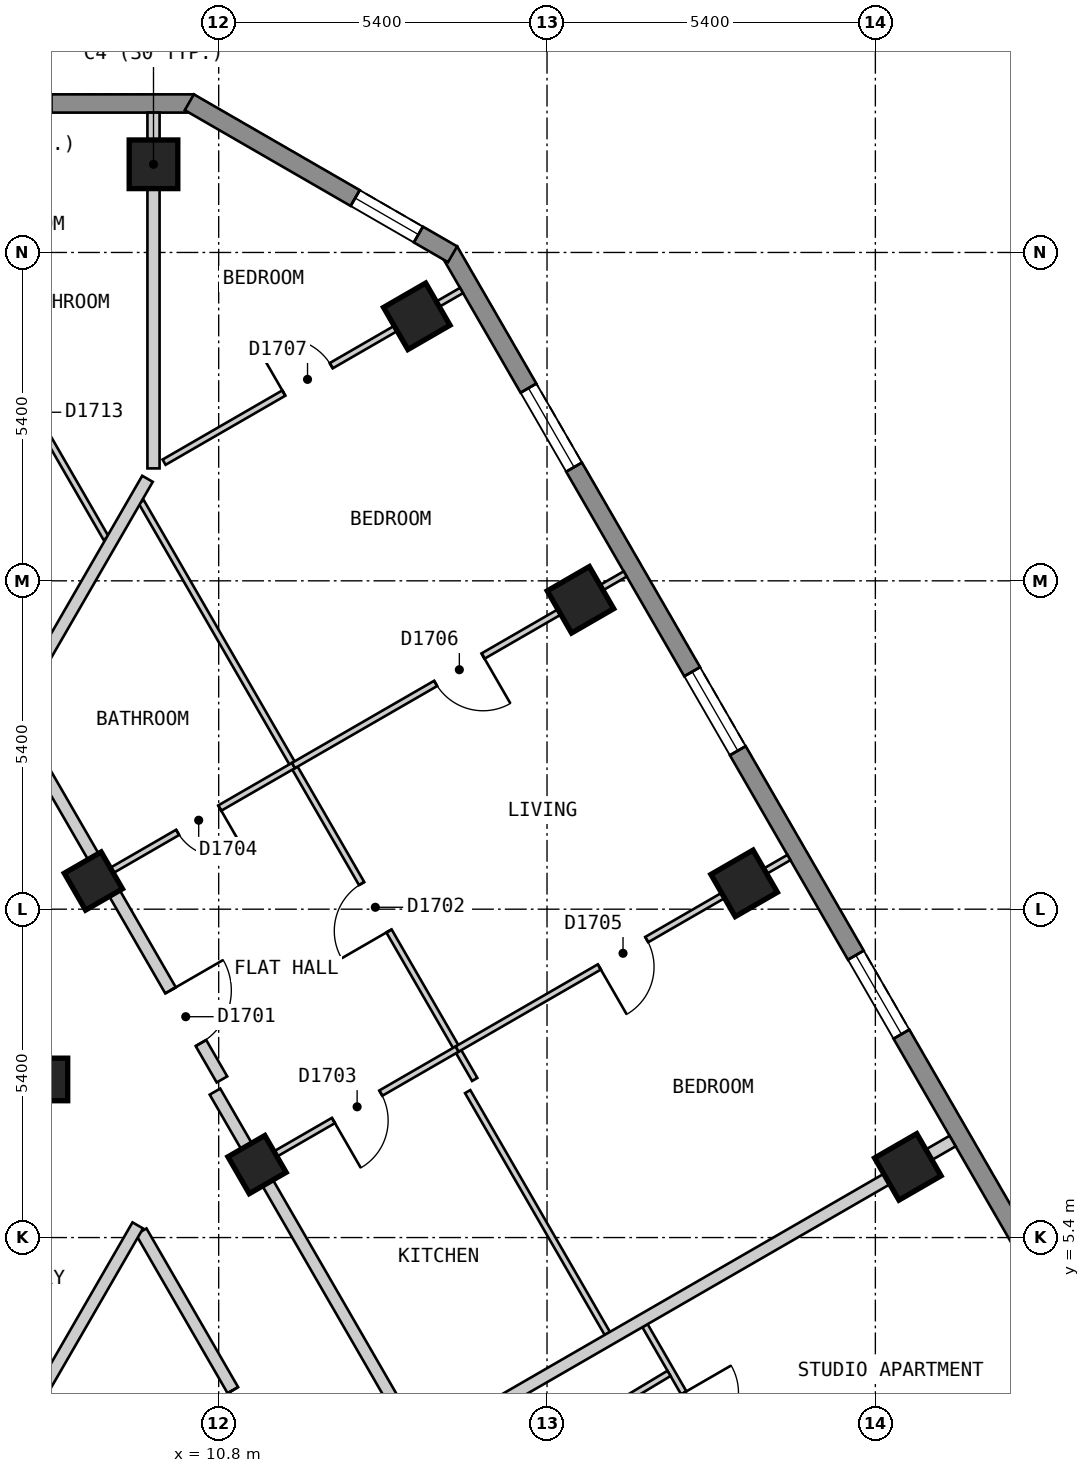
"""IFC4 building model, lengths in metres.
Left out: names, types, materials, properties, quantities, classifications, styles, units other than length and angle.
Written with IfcOpenShell. Run it as: python <this file> out.ifc"""

import sys

from ifc_helpers import new_model, si_unit, direction, frame, frame_2d, origin, origin_2d, place, context, subcontext, project, spatial, polyline, rectangle, outline, extrude, element, fill, save


model = new_model("IFC4")
c1 = context("Model", 3, precision=1e-05, world=origin(), true_north=direction((0.0, 1.0)))
c2 = subcontext(c1, "Body", "Model", "MODEL_VIEW")
j1 = project(units=[si_unit("LENGTHUNIT", "METRE"), si_unit("PLANEANGLEUNIT", "RADIAN")], contexts=[c1])
p1 = place(None, origin())
s1 = spatial("IfcSite", under=j1, at=p1, CompositionType="ELEMENT")
p2 = place(p1, origin())
s2 = spatial("IfcBuilding", under=s1, at=p2, CompositionType="ELEMENT")
p3 = place(p2, frame((0.0, 0.0, 187.2)))
s3 = spatial("IfcBuildingStorey", under=s2, at=p3, CompositionType="ELEMENT", Elevation=187.2)
for number, where, z_axis, x_axis in (
    (1, (9.728, 23.05, 0.0), (0.0, 0.0, 1.0), (-1.0, 0.0, 0.0)),
    (2, (22.134, 6.562, 0.0), (0.0, 0.0, 1.0), (-0.5, 0.866, 0.0)),
    (3, (19.442, 11.225, 0.0), (0.0, 0.0, 1.0), (-0.5, 0.866, 0.0)),
    (4, (16.75, 15.888, 0.0), (0.0, 0.0, 1.0), (-0.5, 0.866, 0.0)),
    (5, (14.058, 20.55, 0.0), (0.0, 0.0, 1.0), (-0.5, 0.866, 0.0)),
):
    element("IfcColumn", number, at=place(p3, frame(where, z_axis=z_axis, x_axis=x_axis)), inside=s3, PredefinedType="COLUMN", context=c2, shape_type="SweptSolid", body=[
        extrude(rectangle(XDim=0.8, YDim=0.8, at=origin_2d()), origin(), (0.0, 0.0, 1.0), 3.0),
    ])
for number, where, z_axis, x_axis in (
    (6, (11.431, 6.6, 0.0), (0.0, 0.0, 1.0), (-0.5, 0.866, 0.0)),
    (7, (7.967, 8.0, 0.0), (0.0, 0.0, 1.0), (1.0, 0.0, 0.0)),
    (8, (8.739, 11.263, 0.0), (0.0, 0.0, 1.0), (-0.5, 0.866, 0.0)),
):
    element("IfcColumn", number, at=place(p3, frame(where, z_axis=z_axis, x_axis=x_axis)), inside=s3, PredefinedType="COLUMN", context=c2, shape_type="SweptSolid", body=[
        extrude(rectangle(XDim=0.7, YDim=0.7, at=origin_2d()), origin(), (0.0, 0.0, 1.0), 3.0),
    ])
p4 = place(p3, frame((10.392, 24.05, 0.0), z_axis=(0.0, 0.0, 1.0), x_axis=(-1.0, 0.0, 0.0)))
e9 = element("IfcWall", 9, at=p4, inside=s3, PredefinedType="SOLIDWALL", context=c2, shape_type="SweptSolid", body=[
    extrude(outline(polyline([(0.0, -0.15), (20.784, -0.15), (20.704, 0.15), (0.08, 0.15), (0.0, -0.15)])), origin(), (0.0, 0.0, 1.0), 2.7),
])
p5 = place(p4, frame((2.346, 0.0, 0.15)))
e10 = element("IfcOpeningElement", 10, at=p5, cuts=e9, PredefinedType="OPENING", context=c2, shape_type="SweptSolid", body=[
    extrude(rectangle(XDim=1.5, YDim=2.1, at=frame_2d((0.75, 1.05))), frame((0.0, 0.16, 0.0), z_axis=(0.0, -1.0, 0.0), x_axis=(1.0, 0.0, 0.0)), (0.0, 0.0, 1.0), 0.32),
])
p6 = place(p4, frame((7.21, 0.0, 0.15)))
e11 = element("IfcOpeningElement", 11, at=p6, cuts=e9, PredefinedType="OPENING", context=c2, shape_type="SweptSolid", body=[
    extrude(rectangle(XDim=1.5, YDim=2.1, at=frame_2d((0.75, 1.05))), frame((0.0, 0.16, 0.0), z_axis=(0.0, -1.0, 0.0), x_axis=(1.0, 0.0, 0.0)), (0.0, 0.0, 1.0), 0.32),
])
p7 = place(p4, frame((12.074, 0.0, 0.15)))
e12 = element("IfcOpeningElement", 12, at=p7, cuts=e9, PredefinedType="OPENING", context=c2, shape_type="SweptSolid", body=[
    extrude(rectangle(XDim=1.5, YDim=2.1, at=frame_2d((0.75, 1.05))), frame((0.0, 0.16, 0.0), z_axis=(0.0, -1.0, 0.0), x_axis=(1.0, 0.0, 0.0)), (0.0, 0.0, 1.0), 0.32),
])
p8 = place(p4, frame((16.938, 0.0, 0.15)))
e13 = element("IfcOpeningElement", 13, at=p8, cuts=e9, PredefinedType="OPENING", context=c2, shape_type="SweptSolid", body=[
    extrude(rectangle(XDim=1.5, YDim=2.1, at=frame_2d((0.75, 1.05))), frame((0.0, 0.16, 0.0), z_axis=(0.0, -1.0, 0.0), x_axis=(1.0, 0.0, 0.0)), (0.0, 0.0, 1.0), 0.32),
])
p9 = place(p3, frame((26.024, 1.825, 0.0), z_axis=(0.0, 0.0, 1.0), x_axis=(-0.500010537973, 0.866019319597, 0.0)))
e14 = element("IfcWall", 14, at=p9, inside=s3, PredefinedType="SOLIDWALL", context=c2, shape_type="SweptSolid", body=[
    extrude(outline(polyline([(0.0, -0.15), (22.863, -0.15), (22.783, 0.15), (0.08, 0.15), (0.0, -0.15)])), origin(), (0.0, 0.0, 1.0), 2.7),
])
p10 = place(p9, frame((2.606, 0.0, 0.15)))
e15 = element("IfcOpeningElement", 15, at=p10, cuts=e14, PredefinedType="OPENING", context=c2, shape_type="SweptSolid", body=[
    extrude(rectangle(XDim=1.5, YDim=2.1, at=frame_2d((0.75, 1.05))), frame((0.0, 0.16, 0.0), z_axis=(0.0, -1.0, 0.0), x_axis=(1.0, 0.0, 0.0)), (0.0, 0.0, 1.0), 0.32),
])
p11 = place(p9, frame((7.99, 0.0, 0.15)))
e16 = element("IfcOpeningElement", 16, at=p11, cuts=e14, PredefinedType="OPENING", context=c2, shape_type="SweptSolid", body=[
    extrude(rectangle(XDim=1.5, YDim=2.1, at=frame_2d((0.75, 1.05))), frame((0.0, 0.16, 0.0), z_axis=(0.0, -1.0, 0.0), x_axis=(1.0, 0.0, 0.0)), (0.0, 0.0, 1.0), 0.32),
])
p12 = place(p9, frame((13.373, 0.0, 0.15)))
e17 = element("IfcOpeningElement", 17, at=p12, cuts=e14, PredefinedType="OPENING", context=c2, shape_type="SweptSolid", body=[
    extrude(rectangle(XDim=1.5, YDim=2.1, at=frame_2d((0.75, 1.05))), frame((0.0, 0.16, 0.0), z_axis=(0.0, -1.0, 0.0), x_axis=(1.0, 0.0, 0.0)), (0.0, 0.0, 1.0), 0.32),
])
p13 = place(p9, frame((18.758, 0.0, 0.15)))
e18 = element("IfcOpeningElement", 18, at=p13, cuts=e14, PredefinedType="OPENING", context=c2, shape_type="SweptSolid", body=[
    extrude(rectangle(XDim=1.5, YDim=2.1, at=frame_2d((0.75, 1.05))), frame((0.0, 0.16, 0.0), z_axis=(0.0, -1.0, 0.0), x_axis=(1.0, 0.0, 0.0)), (0.0, 0.0, 1.0), 0.32),
])
p14 = place(p3, frame((14.647, 21.57, 0.0), z_axis=(0.0, 0.0, 1.0), x_axis=(-0.866022959057, 0.500004234368, 0.0)))
e19 = element("IfcWall", 19, at=p14, inside=s3, PredefinedType="SOLIDWALL", context=c2, shape_type="SweptSolid", body=[
    extrude(outline(polyline([(0.0, -0.15), (5.0, -0.15), (4.92, 0.15), (0.08, 0.15), (0.0, -0.15)])), origin(), (0.0, 0.0, 1.0), 2.7),
])
p15 = place(p14, frame((0.65, 0.0, 0.15)))
e20 = element("IfcOpeningElement", 20, at=p15, cuts=e19, PredefinedType="OPENING", context=c2, shape_type="SweptSolid", body=[
    extrude(rectangle(XDim=1.2, YDim=2.1, at=frame_2d((0.6, 1.05))), frame((0.0, 0.16, 0.0), z_axis=(0.0, -1.0, 0.0), x_axis=(1.0, 0.0, 0.0)), (0.0, 0.0, 1.0), 0.32),
])
p16 = place(p3, frame((9.526, 5.5, 0.0), z_axis=(0.0, 0.0, 1.0), x_axis=(0.500062092869, -0.865989551482, 0.0)))
e21 = element("IfcWall", 21, at=p16, inside=s3, PredefinedType="PARTITIONING", context=c2, shape_type="SweptSolid", body=[
    extrude(rectangle(XDim=6.927, YDim=0.2, at=frame_2d((3.464, 0.0))), origin(), (0.0, 0.0, 1.0), 2.7),
])
p17 = place(p16, frame((3.014, 0.0, 0.0)))
e22 = element("IfcOpeningElement", 22, at=p17, cuts=e21, PredefinedType="OPENING", context=c2, shape_type="SweptSolid", body=[
    extrude(rectangle(XDim=0.9, YDim=2.1, at=frame_2d((0.45, 1.05))), frame((0.0, 0.11, 0.0), z_axis=(0.0, -1.0, 0.0), x_axis=(1.0, 0.0, 0.0)), (0.0, 0.0, 1.0), 0.22),
])
p18 = place(p3, frame((10.739, 7.8, 0.0), z_axis=(0.0, 0.0, 1.0), x_axis=(0.500023726918, -0.866011704609, 0.0)))
e23 = element("IfcWall", 23, at=p18, inside=s3, PredefinedType="PARTITIONING", context=c2, shape_type="SweptSolid", body=[
    extrude(rectangle(XDim=9.47, YDim=0.2, at=frame_2d((4.735, 0.0))), origin(), (0.0, 0.0, 1.0), 2.7),
])
p19 = place(p18, frame((8.168, 0.0, 0.0)))
e24 = element("IfcOpeningElement", 24, at=p19, cuts=e23, PredefinedType="OPENING", context=c2, shape_type="SweptSolid", body=[
    extrude(rectangle(XDim=1.0, YDim=2.1, at=frame_2d((0.5, 1.05))), frame((0.0, 0.11, 0.0), z_axis=(0.0, -1.0, 0.0), x_axis=(1.0, 0.0, 0.0)), (0.0, 0.0, 1.0), 0.22),
])
p20 = place(p3, frame((5.485, 17.3, 0.0), z_axis=(0.0, 0.0, 1.0), x_axis=(0.499965832213, -0.866045129667, 0.0)))
e25 = element("IfcWall", 25, at=p20, inside=s3, PredefinedType="PARTITIONING", context=c2, shape_type="SweptSolid", body=[
    extrude(rectangle(XDim=10.739, YDim=0.2, at=frame_2d((5.369, 0.0))), origin(), (0.0, 0.0, 1.0), 2.7),
])
p21 = place(p20, frame((9.047, 0.0, 0.0)))
e26 = element("IfcOpeningElement", 26, at=p21, cuts=e25, PredefinedType="OPENING", context=c2, shape_type="SweptSolid", body=[
    extrude(rectangle(XDim=1.0, YDim=2.1, at=frame_2d((0.5, 1.05))), frame((0.0, 0.11, 0.0), z_axis=(0.0, -1.0, 0.0), x_axis=(1.0, 0.0, 0.0)), (0.0, 0.0, 1.0), 0.22),
])
p22 = place(p3, frame((7.028, 1.373, 0.0), z_axis=(0.0, 0.0, 1.0), x_axis=(0.500065924398, 0.86598733897, 0.0)))
e27 = element("IfcWall", 27, at=p22, inside=s3, PredefinedType="PARTITIONING", context=c2, shape_type="SweptSolid", body=[
    extrude(rectangle(XDim=4.881, YDim=0.2, at=frame_2d((2.44, 0.0))), origin(), (0.0, 0.0, 1.0), 2.7),
])
p23 = place(p3, frame((7.073, 20.15, 0.0), z_axis=(0.0, 0.0, 1.0), x_axis=(0.499917691695, -0.866072919292, 0.0)))
e28 = element("IfcWall", 28, at=p23, inside=s3, PredefinedType="PARTITIONING", context=c2, shape_type="SweptSolid", body=[
    extrude(rectangle(XDim=3.753, YDim=0.1, at=frame_2d((1.876, 0.0))), origin(), (0.0, 0.0, 1.0), 2.7),
])
p24 = place(p23, frame((0.96, 0.0, 0.0)))
e29 = element("IfcOpeningElement", 29, at=p24, cuts=e28, PredefinedType="OPENING", context=c2, shape_type="SweptSolid", body=[
    extrude(rectangle(XDim=0.8, YDim=2.1, at=frame_2d((0.4, 1.05))), frame((0.0, 0.06, 0.0), z_axis=(0.0, -1.0, 0.0), x_axis=(1.0, 0.0, 0.0)), (0.0, 0.0, 1.0), 0.12),
])
p25 = place(p3, frame((14.895, 7.8, 0.0), z_axis=(0.0, 0.0, 1.0), x_axis=(0.500050787847, -0.865996079421, 0.0)))
e30 = element("IfcWall", 30, at=p25, inside=s3, PredefinedType="PARTITIONING", context=c2, shape_type="SweptSolid", body=[
    extrude(rectangle(XDim=4.591, YDim=0.1, at=frame_2d((2.296, 0.0))), origin(), (0.0, 0.0, 1.0), 2.7),
])
p26 = place(p3, frame((9.526, 17.5, 0.0), z_axis=(0.0, 0.0, 1.0), x_axis=(0.500019134094, -0.866014356428, 0.0)))
e31 = element("IfcWall", 31, at=p26, inside=s3, PredefinedType="PARTITIONING", context=c2, shape_type="SweptSolid", body=[
    extrude(rectangle(XDim=10.97, YDim=0.1, at=frame_2d((5.485, 0.0))), origin(), (0.0, 0.0, 1.0), 2.7),
])
p27 = place(p26, frame((7.25, 0.0, 0.0)))
e32 = element("IfcOpeningElement", 32, at=p27, cuts=e31, PredefinedType="OPENING", context=c2, shape_type="SweptSolid", body=[
    extrude(rectangle(XDim=0.9, YDim=2.1, at=frame_2d((0.45, 1.05))), frame((0.0, 0.06, 0.0), z_axis=(0.0, -1.0, 0.0), x_axis=(1.0, 0.0, 0.0)), (0.0, 0.0, 1.0), 0.12),
])
p28 = place(p3, frame((17.811, 3.951, 0.0), z_axis=(0.0, 0.0, 1.0), x_axis=(0.499976149225, -0.866039173598, 0.0)))
e33 = element("IfcWall", 33, at=p28, inside=s3, PredefinedType="PARTITIONING", context=c2, shape_type="SweptSolid", body=[
    extrude(rectangle(XDim=2.888, YDim=0.1, at=frame_2d((1.444, 0.0))), origin(), (0.0, 0.0, 1.0), 2.7),
])
p29 = place(p28, frame((1.276, 0.0, 0.0)))
e34 = element("IfcOpeningElement", 34, at=p29, cuts=e33, PredefinedType="OPENING", context=c2, shape_type="SweptSolid", body=[
    extrude(rectangle(XDim=0.9, YDim=2.1, at=frame_2d((0.45, 1.05))), frame((0.0, 0.06, 0.0), z_axis=(0.0, -1.0, 0.0), x_axis=(1.0, 0.0, 0.0)), (0.0, 0.0, 1.0), 0.12),
])
p30 = place(p3, frame((11.518, 6.65, 0.0), z_axis=(0.0, 0.0, 1.0), x_axis=(0.865984470368, 0.500070892056, 0.0)))
e35 = element("IfcWall", 35, at=p30, inside=s3, PredefinedType="PARTITIONING", context=c2, shape_type="SweptSolid", body=[
    extrude(rectangle(XDim=3.7, YDim=0.1, at=frame_2d((1.85, 0.0))), origin(), (0.0, 0.0, 1.0), 2.7),
])
p31 = place(p30, frame((1.35, 0.0, 0.0)))
e36 = element("IfcOpeningElement", 36, at=p31, cuts=e35, PredefinedType="OPENING", context=c2, shape_type="SweptSolid", body=[
    extrude(rectangle(XDim=0.9, YDim=2.1, at=frame_2d((0.45, 1.05))), frame((0.0, 0.06, 0.0), z_axis=(0.0, -1.0, 0.0), x_axis=(1.0, 0.0, 0.0)), (0.0, 0.0, 1.0), 0.12),
])
p32 = place(p3, frame((8.999, 11.413, 0.0), z_axis=(0.0, 0.0, 1.0), x_axis=(0.866019471182, 0.500010275428, 0.0)))
e37 = element("IfcWall", 37, at=p32, inside=s3, PredefinedType="PARTITIONING", context=c2, shape_type="SweptSolid", body=[
    extrude(rectangle(XDim=3.5, YDim=0.1, at=frame_2d((1.75, 0.0))), origin(), (0.0, 0.0, 1.0), 2.7),
])
p33 = place(p32, frame((1.3, 0.0, 0.0)))
e38 = element("IfcOpeningElement", 38, at=p33, cuts=e37, PredefinedType="OPENING", context=c2, shape_type="SweptSolid", body=[
    extrude(rectangle(XDim=0.8, YDim=2.1, at=frame_2d((0.4, 1.05))), frame((0.0, 0.06, 0.0), z_axis=(0.0, -1.0, 0.0), x_axis=(1.0, 0.0, 0.0)), (0.0, 0.0, 1.0), 0.12),
])
p34 = place(p3, frame((9.902, 18.151, 0.0), z_axis=(0.0, 0.0, 1.0), x_axis=(0.866032278734, 0.499988092049, 0.0)))
e39 = element("IfcWall", 39, at=p34, inside=s3, PredefinedType="PARTITIONING", context=c2, shape_type="SweptSolid", body=[
    extrude(rectangle(XDim=5.649, YDim=0.1, at=frame_2d((2.824, 0.0))), origin(), (0.0, 0.0, 1.0), 2.7),
])
p35 = place(p34, frame((2.274, 0.0, 0.0)))
e40 = element("IfcOpeningElement", 40, at=p35, cuts=e39, PredefinedType="OPENING", context=c2, shape_type="SweptSolid", body=[
    extrude(rectangle(XDim=0.9, YDim=2.1, at=frame_2d((0.45, 1.05))), frame((0.0, 0.06, 0.0), z_axis=(0.0, -1.0, 0.0), x_axis=(1.0, 0.0, 0.0)), (0.0, 0.0, 1.0), 0.12),
])
p36 = place(p3, frame((14.734, 1.08, 0.0), z_axis=(0.0, 0.0, 1.0), x_axis=(0.857205608004, 0.514974315482, 0.0)))
e41 = element("IfcWall", 41, at=p36, inside=s3, PredefinedType="PARTITIONING", context=c2, shape_type="SweptSolid", body=[
    extrude(rectangle(XDim=4.051, YDim=0.1, at=frame_2d((2.025, 0.0))), origin(), (0.0, 0.0, 1.0), 2.7),
])
p37 = place(p36, frame((1.6, 0.0, 0.0)))
e42 = element("IfcOpeningElement", 42, at=p37, cuts=e41, PredefinedType="OPENING", context=c2, shape_type="SweptSolid", body=[
    extrude(rectangle(XDim=0.8, YDim=2.1, at=frame_2d((0.4, 1.05))), frame((0.0, 0.06, 0.0), z_axis=(0.0, -1.0, 0.0), x_axis=(1.0, 0.0, 0.0)), (0.0, 0.0, 1.0), 0.12),
])
p38 = place(p3, frame((7.448, 14.1, 0.0), z_axis=(0.0, 0.0, 1.0), x_axis=(0.499961462843, 0.866047652079, 0.0)))
e43 = element("IfcWall", 43, at=p38, inside=s3, PredefinedType="PARTITIONING", context=c2, shape_type="SweptSolid", body=[
    extrude(rectangle(XDim=4.362, YDim=0.2, at=frame_2d((2.181, 0.0))), origin(), (0.0, 0.0, 1.0), 2.7),
])
p39 = place(p3, frame((9.728, 18.049, 0.0), z_axis=(0.0, 0.0, 1.0), x_axis=(0.0, 1.0, 0.0)))
e44 = element("IfcWall", 44, at=p39, inside=s3, PredefinedType="PARTITIONING", context=c2, shape_type="SweptSolid", body=[
    extrude(rectangle(XDim=5.851, YDim=0.2, at=frame_2d((2.925, 0.0))), origin(), (0.0, 0.0, 1.0), 2.7),
])
p40 = place(p3, frame((14.21, 1.987, 0.0), z_axis=(0.0, 0.0, 1.0), x_axis=(0.866022959057, 0.500004234368, 0.0)))
e45 = element("IfcWall", 45, at=p40, inside=s3, PredefinedType="PARTITIONING", context=c2, shape_type="SweptSolid", body=[
    extrude(rectangle(XDim=10.0, YDim=0.2, at=frame_2d((5.0, 0.0))), origin(), (0.0, 0.0, 1.0), 2.7),
])
p41 = place(p3, frame((14.722, 8.5, 0.0), z_axis=(0.0, 0.0, 1.0), x_axis=(0.866035871367, 0.499981869177, 0.0)))
e46 = element("IfcWall", 46, at=p41, inside=s3, PredefinedType="PARTITIONING", context=c2, shape_type="SweptSolid", body=[
    extrude(rectangle(XDim=6.3, YDim=0.1, at=frame_2d((3.15, 0.0))), origin(), (0.0, 0.0, 1.0), 2.7),
])
p42 = place(p41, frame((2.7, 0.0, 0.0)))
e47 = element("IfcOpeningElement", 47, at=p42, cuts=e46, PredefinedType="OPENING", context=c2, shape_type="SweptSolid", body=[
    extrude(rectangle(XDim=0.9, YDim=2.1, at=frame_2d((0.45, 1.05))), frame((0.0, 0.06, 0.0), z_axis=(0.0, -1.0, 0.0), x_axis=(1.0, 0.0, 0.0)), (0.0, 0.0, 1.0), 0.12),
])
p43 = place(p3, frame((12.03, 13.163, 0.0), z_axis=(0.0, 0.0, 1.0), x_axis=(0.866035871367, 0.499981869177, 0.0)))
e48 = element("IfcWall", 48, at=p43, inside=s3, PredefinedType="PARTITIONING", context=c2, shape_type="SweptSolid", body=[
    extrude(rectangle(XDim=6.3, YDim=0.1, at=frame_2d((3.15, 0.0))), origin(), (0.0, 0.0, 1.0), 2.7),
])
p44 = place(p43, frame((2.7, 0.0, 0.0)))
e49 = element("IfcOpeningElement", 49, at=p44, cuts=e48, PredefinedType="OPENING", context=c2, shape_type="SweptSolid", body=[
    extrude(rectangle(XDim=0.9, YDim=2.1, at=frame_2d((0.45, 1.05))), frame((0.0, 0.06, 0.0), z_axis=(0.0, -1.0, 0.0), x_axis=(1.0, 0.0, 0.0)), (0.0, 0.0, 1.0), 0.12),
])
p45 = place(p11, origin())
e50 = element("IfcWindow", 50, at=p45, inside=s3, PartitioningType="SINGLE_PANEL", PredefinedType="WINDOW", context=c2, shape_type="SweptSolid", body=[
    extrude(rectangle(XDim=1.5, YDim=2.1, at=frame_2d((0.75, 1.05))), frame((0.0, 0.03, 0.0), z_axis=(0.0, -1.0, 0.0), x_axis=(1.0, 0.0, 0.0)), (0.0, 0.0, 1.0), 0.06),
])
fill(e16, e50)
p46 = place(p12, origin())
e51 = element("IfcWindow", 51, at=p46, inside=s3, PartitioningType="SINGLE_PANEL", PredefinedType="WINDOW", context=c2, shape_type="SweptSolid", body=[
    extrude(rectangle(XDim=1.5, YDim=2.1, at=frame_2d((0.75, 1.05))), frame((0.0, 0.03, 0.0), z_axis=(0.0, -1.0, 0.0), x_axis=(1.0, 0.0, 0.0)), (0.0, 0.0, 1.0), 0.06),
])
fill(e17, e51)
p47 = place(p13, origin())
e52 = element("IfcWindow", 52, at=p47, inside=s3, PartitioningType="SINGLE_PANEL", PredefinedType="WINDOW", context=c2, shape_type="SweptSolid", body=[
    extrude(rectangle(XDim=1.5, YDim=2.1, at=frame_2d((0.75, 1.05))), frame((0.0, 0.03, 0.0), z_axis=(0.0, -1.0, 0.0), x_axis=(1.0, 0.0, 0.0)), (0.0, 0.0, 1.0), 0.06),
])
fill(e18, e52)
p48 = place(p15, origin())
e53 = element("IfcWindow", 53, at=p48, inside=s3, PartitioningType="SINGLE_PANEL", PredefinedType="WINDOW", context=c2, shape_type="SweptSolid", body=[
    extrude(rectangle(XDim=1.2, YDim=2.1, at=frame_2d((0.6, 1.05))), frame((0.0, 0.03, 0.0), z_axis=(0.0, -1.0, 0.0), x_axis=(1.0, 0.0, 0.0)), (0.0, 0.0, 1.0), 0.06),
])
fill(e20, e53)
p49 = place(p21, origin())
e54 = element("IfcDoor", 54, at=p49, inside=s3, OperationType="SINGLE_SWING_LEFT", PredefinedType="DOOR", context=c2, shape_type="SweptSolid", body=[
    extrude(rectangle(XDim=1.0, YDim=2.1, at=frame_2d((0.5, 1.05))), frame((0.0, 0.025, 0.0), z_axis=(0.0, -1.0, 0.0), x_axis=(1.0, 0.0, 0.0)), (0.0, 0.0, 1.0), 0.05),
])
fill(e26, e54)
p50 = place(p27, origin())
e55 = element("IfcDoor", 55, at=p50, inside=s3, OperationType="SINGLE_SWING_RIGHT", PredefinedType="DOOR", context=c2, shape_type="SweptSolid", body=[
    extrude(rectangle(XDim=0.9, YDim=2.1, at=frame_2d((0.45, 1.05))), frame((0.0, 0.025, 0.0), z_axis=(0.0, -1.0, 0.0), x_axis=(1.0, 0.0, 0.0)), (0.0, 0.0, 1.0), 0.05),
])
fill(e32, e55)
p51 = place(p31, origin())
e56 = element("IfcDoor", 56, at=p51, inside=s3, OperationType="SINGLE_SWING_LEFT", PredefinedType="DOOR", context=c2, shape_type="SweptSolid", body=[
    extrude(rectangle(XDim=0.9, YDim=2.1, at=frame_2d((0.45, 1.05))), frame((0.0, 0.025, 0.0), z_axis=(0.0, -1.0, 0.0), x_axis=(1.0, 0.0, 0.0)), (0.0, 0.0, 1.0), 0.05),
])
fill(e36, e56)
p52 = place(p33, origin())
e57 = element("IfcDoor", 57, at=p52, inside=s3, OperationType="SINGLE_SWING_RIGHT", PredefinedType="DOOR", context=c2, shape_type="SweptSolid", body=[
    extrude(rectangle(XDim=0.8, YDim=2.1, at=frame_2d((0.4, 1.05))), frame((0.0, 0.025, 0.0), z_axis=(0.0, -1.0, 0.0), x_axis=(1.0, 0.0, 0.0)), (0.0, 0.0, 1.0), 0.05),
])
fill(e38, e57)
p53 = place(p42, origin())
e58 = element("IfcDoor", 58, at=p53, inside=s3, OperationType="SINGLE_SWING_LEFT", PredefinedType="DOOR", context=c2, shape_type="SweptSolid", body=[
    extrude(rectangle(XDim=0.9, YDim=2.1, at=frame_2d((0.45, 1.05))), frame((0.0, 0.025, 0.0), z_axis=(0.0, -1.0, 0.0), x_axis=(1.0, 0.0, 0.0)), (0.0, 0.0, 1.0), 0.05),
])
fill(e47, e58)
p54 = place(p44, origin())
e59 = element("IfcDoor", 59, at=p54, inside=s3, OperationType="SINGLE_SWING_RIGHT", PredefinedType="DOOR", context=c2, shape_type="SweptSolid", body=[
    extrude(rectangle(XDim=0.9, YDim=2.1, at=frame_2d((0.45, 1.05))), frame((0.0, 0.025, 0.0), z_axis=(0.0, -1.0, 0.0), x_axis=(1.0, 0.0, 0.0)), (0.0, 0.0, 1.0), 0.05),
])
fill(e49, e59)
p55 = place(p35, origin())
e60 = element("IfcDoor", 60, at=p55, inside=s3, OperationType="SINGLE_SWING_LEFT", PredefinedType="DOOR", context=c2, shape_type="SweptSolid", body=[
    extrude(rectangle(XDim=0.9, YDim=2.1, at=frame_2d((0.45, 1.05))), frame((0.0, 0.025, 0.0), z_axis=(0.0, -1.0, 0.0), x_axis=(1.0, 0.0, 0.0)), (0.0, 0.0, 1.0), 0.05),
])
fill(e40, e60)
p56 = place(p29, origin())
e61 = element("IfcDoor", 61, at=p56, inside=s3, OperationType="SINGLE_SWING_LEFT", PredefinedType="DOOR", context=c2, shape_type="SweptSolid", body=[
    extrude(rectangle(XDim=0.9, YDim=2.1, at=frame_2d((0.45, 1.05))), frame((0.0, 0.025, 0.0), z_axis=(0.0, -1.0, 0.0), x_axis=(1.0, 0.0, 0.0)), (0.0, 0.0, 1.0), 0.05),
])
fill(e34, e61)
p57 = place(p17, origin())
e62 = element("IfcDoor", 62, at=p57, inside=s3, OperationType="SINGLE_SWING_LEFT", PredefinedType="DOOR", context=c2, shape_type="SweptSolid", body=[
    extrude(rectangle(XDim=0.9, YDim=2.1, at=frame_2d((0.45, 1.05))), frame((0.0, 0.025, 0.0), z_axis=(0.0, -1.0, 0.0), x_axis=(1.0, 0.0, 0.0)), (0.0, 0.0, 1.0), 0.05),
])
fill(e22, e62)
save(model, sys.argv[1])
